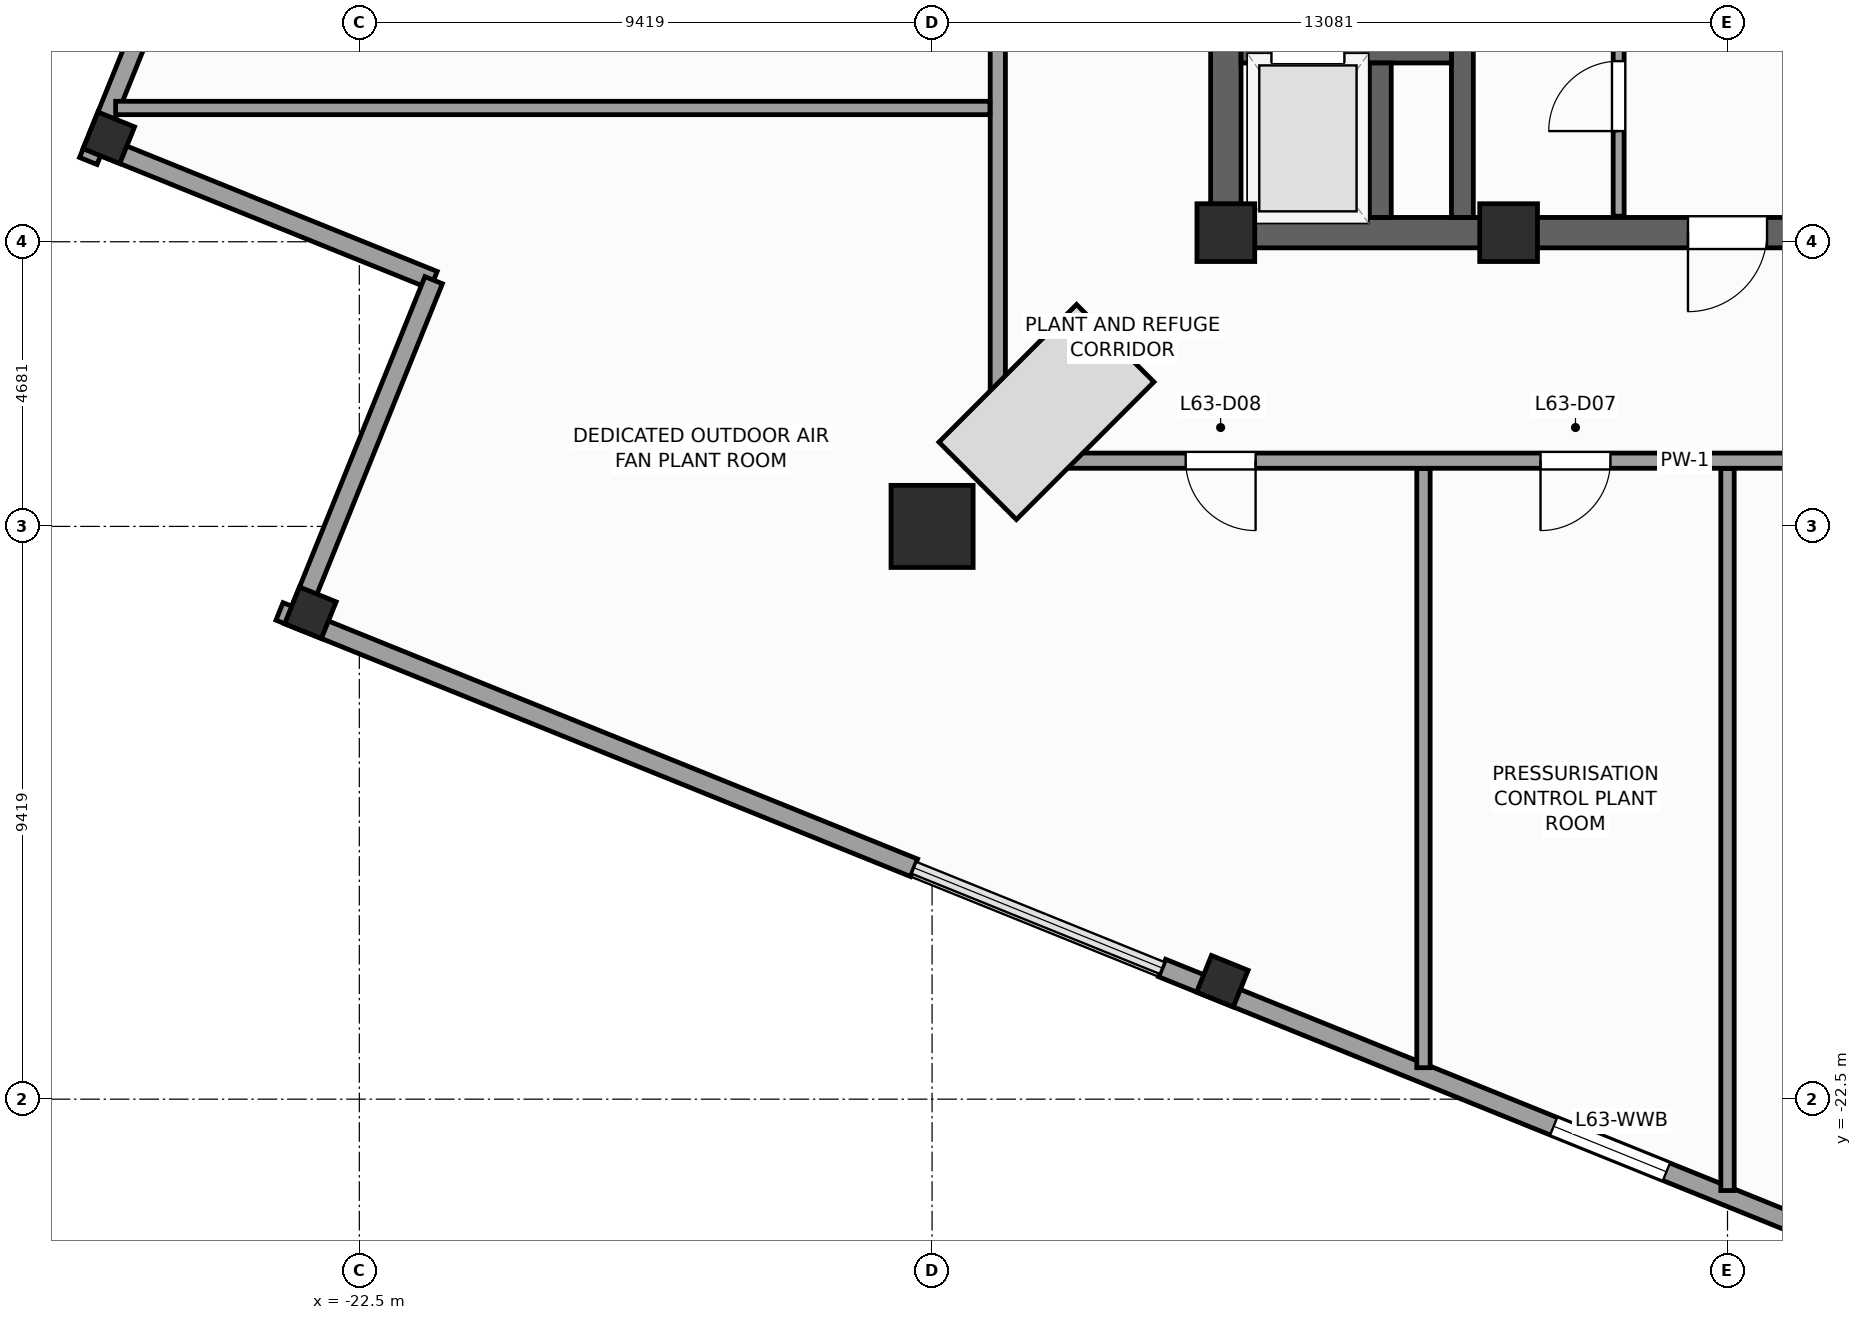
"""IFC4 building model, lengths in metres.
Left out: names, types, materials, properties, quantities, classifications, styles, units other than length and angle.
Written with IfcOpenShell. Run it as: python <this file> out.ifc"""

import sys

from ifc_helpers import new_model, si_unit, direction, frame, frame_2d, origin, origin_2d, place, context, subcontext, project, spatial, rectangle, extrude, source, transform, mapped, element, fill, save


model = new_model("IFC4")
c1 = context("Model", 3, precision=1e-05, world=origin(), true_north=direction((0.0, 1.0)))
c2 = subcontext(c1, "Body", "Model", "MODEL_VIEW")
j1 = project(units=[si_unit("LENGTHUNIT", "METRE"), si_unit("PLANEANGLEUNIT", "RADIAN")], contexts=[c1])
p1 = place(None, origin())
s1 = spatial("IfcSite", under=j1, at=p1, CompositionType="ELEMENT")
p2 = place(p1, origin())
s2 = spatial("IfcBuilding", under=s1, at=p2, CompositionType="ELEMENT")
p3 = place(p2, frame((0.0, 0.0, 260.2)))
s3 = spatial("IfcBuildingStorey", under=s2, at=p3, CompositionType="ELEMENT", Elevation=260.2)
p4 = place(p3, frame((-8.5, -8.25, 0.0), z_axis=(0.0, 0.0, 1.0), x_axis=(1.0, 0.0, 0.0)))
e1 = element("IfcWall", 1, at=p4, inside=s3, PredefinedType="SHEAR", context=c2, shape_type="SweptSolid", body=[
    extrude(rectangle(XDim=17.0, YDim=0.5, at=frame_2d((8.5, 0.0))), origin(), (0.0, 0.0, 1.0), 5.0),
])
p5 = place(p4, frame((7.85, 0.0, 0.0)))
e2 = element("IfcOpeningElement", 2, at=p5, cuts=e1, PredefinedType="OPENING", context=c2, shape_type="SweptSolid", body=[
    extrude(rectangle(XDim=1.3, YDim=2.2, at=frame_2d((0.65, 1.1))), frame((0.0, 0.26, 0.0), z_axis=(0.0, -1.0, 0.0), x_axis=(1.0, 0.0, 0.0)), (0.0, 0.0, 1.0), 0.52),
])
p6 = place(p3, frame((-8.25, -8.0, 0.0), z_axis=(0.0, 0.0, 1.0), x_axis=(0.0, 1.0, 0.0)))
e3 = element("IfcWall", 3, at=p6, inside=s3, PredefinedType="SHEAR", context=c2, shape_type="SweptSolid", body=[
    extrude(rectangle(XDim=16.0, YDim=0.5, at=frame_2d((8.0, 0.0))), origin(), (0.0, 0.0, 1.0), 5.0),
])
p7 = place(p6, frame((4.69, 0.0, 0.0)))
e4 = element("IfcOpeningElement", 4, at=p7, cuts=e3, PredefinedType="OPENING", context=c2, shape_type="SweptSolid", body=[
    extrude(rectangle(XDim=1.3, YDim=2.2, at=frame_2d((0.65, 1.1))), frame((0.0, 0.26, 0.0), z_axis=(0.0, -1.0, 0.0), x_axis=(1.0, 0.0, 0.0)), (0.0, 0.0, 1.0), 0.52),
])
p8 = place(p3, frame((-4.36, -8.0, 0.0), z_axis=(0.0, 0.0, 1.0), x_axis=(0.0, 1.0, 0.0)))
e5 = element("IfcWall", 5, at=p8, inside=s3, PredefinedType="SHEAR", context=c2, shape_type="SweptSolid", body=[
    extrude(rectangle(XDim=16.0, YDim=0.36, at=frame_2d((8.0, 0.0))), origin(), (0.0, 0.0, 1.0), 5.0),
])
p9 = place(p3, frame((-8.0, -5.28, 0.0), z_axis=(0.0, 0.0, 1.0), x_axis=(1.0, 0.0, 0.0)))
e6 = element("IfcWall", 6, at=p9, inside=s3, PredefinedType="SHEAR", context=c2, shape_type="SweptSolid", body=[
    extrude(rectangle(XDim=3.46, YDim=0.36, at=frame_2d((1.73, 0.0))), origin(), (0.0, 0.0, 1.0), 5.0),
])
p10 = place(p9, frame((0.5, 0.0, 0.0)))
e7 = element("IfcOpeningElement", 7, at=p10, cuts=e6, PredefinedType="OPENING", context=c2, shape_type="SweptSolid", body=[
    extrude(rectangle(XDim=1.2, YDim=2.25, at=frame_2d((0.6, 1.125))), frame((0.0, 0.19, 0.0), z_axis=(0.0, -1.0, 0.0), x_axis=(1.0, 0.0, 0.0)), (0.0, 0.0, 1.0), 0.38),
])
p11 = place(p3, frame((-5.71, -8.0, 0.0), z_axis=(0.0, 0.0, 1.0), x_axis=(0.0, 1.0, 0.0)))
e8 = element("IfcWall", 8, at=p11, inside=s3, PredefinedType="SHEAR", context=c2, shape_type="SweptSolid", body=[
    extrude(rectangle(XDim=2.54, YDim=0.36, at=frame_2d((1.27, 0.0))), origin(), (0.0, 0.0, 1.0), 5.0),
])
m1 = source(origin(), c2, "Body", "SweptSolid", [
    extrude(rectangle(XDim=0.95, YDim=0.95, at=origin_2d()), origin(), (0.0, 0.0, 1.0), 5.0),
])
for number, where, z_axis, x_axis in (
    (9, (-8.25, -8.25, 0.0), (0.0, 0.0, 1.0), (1.0, 0.0, 0.0)),
    (10, (-3.6, -8.25, 0.0), (0.0, 0.0, 1.0), (1.0, 0.0, 0.0)),
):
    element("IfcColumn", number, at=place(p3, frame(where, z_axis=z_axis, x_axis=x_axis)), inside=s3, PredefinedType="PILASTER", context=c2, shape_type="MappedRepresentation", body=[
        mapped(m1, transform((0.0, 0.0, 0.0), scale=1.0)),
    ])
m2 = source(origin(), c2, "Body", "SweptSolid", [
    extrude(rectangle(XDim=1.35, YDim=1.35, at=origin_2d()), origin(), (0.0, 0.0, 1.0), 5.0),
])
p12 = place(p3, frame((-13.081, -13.081, 0.0), z_axis=(0.0, 0.0, 1.0), x_axis=(1.0, 0.0, 0.0)))
e11 = element("IfcColumn", 11, at=p12, inside=s3, PredefinedType="COLUMN", context=c2, shape_type="MappedRepresentation", body=[
    mapped(m2, transform((0.0, 0.0, 0.0), scale=1.0)),
])
m3 = source(origin(), c2, "Body", "SweptSolid", [
    extrude(rectangle(XDim=0.65, YDim=0.65, at=origin_2d()), origin(), (0.0, 0.0, 1.0), 5.0),
])
for number, where, z_axis, x_axis in (
    (12, (-26.62, -6.69, 0.0), (0.0, 0.0, 1.0), (0.375, 0.927, 0.0)),
    (13, (-23.304, -14.501, 0.0), (0.0, 0.0, 1.0), (0.375, 0.927, 0.0)),
    (14, (-8.307, -20.56, 0.0), (0.0, 0.0, 1.0), (0.375, 0.927, 0.0)),
):
    element("IfcColumn", number, at=place(p3, frame(where, z_axis=z_axis, x_axis=x_axis)), inside=s3, PredefinedType="COLUMN", context=c2, shape_type="MappedRepresentation", body=[
        mapped(m3, transform((0.0, 0.0, 0.0), scale=1.0)),
    ])
p13 = place(p3, frame((-26.841, -6.784, 0.0), z_axis=(0.0, 0.0, 1.0), x_axis=(0.927171722085, -0.374636620962, 0.0)))
e15 = element("IfcWall", 15, at=p13, inside=s3, PredefinedType="STANDARD", context=c2, shape_type="SweptSolid", body=[
    extrude(rectangle(XDim=6.0, YDim=0.31, at=frame_2d((3.0, 0.0))), origin(), (0.0, 0.0, 1.0), 4.05),
])
p14 = place(p3, frame((-21.278, -9.032, 0.0), z_axis=(0.0, 0.0, 1.0), x_axis=(-0.374602739196, -0.927185411764, 0.0)))
e16 = element("IfcWall", 16, at=p14, inside=s3, PredefinedType="STANDARD", context=c2, shape_type="SweptSolid", body=[
    extrude(rectangle(XDim=6.155, YDim=0.31, at=frame_2d((3.078, 0.0))), origin(), (0.0, 0.0, 1.0), 4.75),
])
p15 = place(p3, frame((-20.718, 8.371, 0.0), z_axis=(0.0, 0.0, 1.0), x_axis=(-0.374600710538, -0.927186231382, 0.0)))
e17 = element("IfcWall", 17, at=p15, inside=s3, PredefinedType="STANDARD", context=c2, shape_type="SweptSolid", body=[
    extrude(rectangle(XDim=16.655, YDim=0.31, at=frame_2d((8.328, 0.0))), origin(), (0.0, 0.0, 1.0), 4.15),
])
p16 = place(p15, frame((6.495, 0.0, 0.65)))
e18 = element("IfcOpeningElement", 18, at=p16, cuts=e17, PredefinedType="OPENING", context=c2, shape_type="SweptSolid", body=[
    extrude(rectangle(XDim=2.0, YDim=1.45, at=frame_2d((1.0, 0.725))), frame((0.0, 0.165, 0.0), z_axis=(0.0, -1.0, 0.0), x_axis=(1.0, 0.0, 0.0)), (0.0, 0.0, 1.0), 0.33),
])
p17 = place(p3, frame((-23.813, -14.479, 0.0), z_axis=(0.0, 0.0, 1.0), x_axis=(0.927178527544, -0.374619777991, 0.0)))
e19 = element("IfcWall", 19, at=p17, inside=s3, PredefinedType="STANDARD", context=c2, shape_type="SweptSolid", body=[
    extrude(rectangle(XDim=11.255, YDim=0.31, at=frame_2d((5.627, 0.0))), origin(), (0.0, 0.0, 1.0), 4.15),
])
p18 = place(p3, frame((-9.298, -20.343, 0.0), z_axis=(0.0, 0.0, 1.0), x_axis=(0.927183654967, -0.374607087443, 0.0)))
e20 = element("IfcWall", 20, at=p18, inside=s3, PredefinedType="STANDARD", context=c2, shape_type="SweptSolid", body=[
    extrude(rectangle(XDim=17.655, YDim=0.31, at=frame_2d((8.828, 0.0))), origin(), (0.0, 0.0, 1.0), 4.15),
])
p19 = place(p18, frame((6.945, 0.0, 0.65)))
e21 = element("IfcOpeningElement", 21, at=p19, cuts=e20, PredefinedType="OPENING", context=c2, shape_type="SweptSolid", body=[
    extrude(rectangle(XDim=2.0, YDim=1.45, at=frame_2d((1.0, 0.725))), frame((0.0, 0.165, 0.0), z_axis=(0.0, -1.0, 0.0), x_axis=(1.0, 0.0, 0.0)), (0.0, 0.0, 1.0), 0.33),
])
p20 = place(p3, frame((-1.79, -7.98, 0.0), z_axis=(0.0, 0.0, 1.0), x_axis=(0.0, 1.0, 0.0)))
e22 = element("IfcWall", 22, at=p20, inside=s3, PredefinedType="PARTITIONING", context=c2, shape_type="SweptSolid", body=[
    extrude(rectangle(XDim=12.38, YDim=0.18, at=frame_2d((6.19, 0.0))), origin(), (0.0, 0.0, 1.0), 4.75),
])
p21 = place(p20, frame((8.8, 0.0, 0.0)))
e23 = element("IfcOpeningElement", 23, at=p21, cuts=e22, PredefinedType="OPENING", context=c2, shape_type="SweptSolid", body=[
    extrude(rectangle(XDim=1.1, YDim=2.2, at=frame_2d((0.55, 1.1))), frame((0.0, 0.1, 0.0), z_axis=(0.0, -1.0, 0.0), x_axis=(1.0, 0.0, 0.0)), (0.0, 0.0, 1.0), 0.2),
])
p22 = place(p20, frame((10.86, 0.0, 0.0)))
e24 = element("IfcOpeningElement", 24, at=p22, cuts=e22, PredefinedType="OPENING", context=c2, shape_type="SweptSolid", body=[
    extrude(rectangle(XDim=1.1, YDim=2.2, at=frame_2d((0.55, 1.1))), frame((0.0, 0.1, 0.0), z_axis=(0.0, -1.0, 0.0), x_axis=(1.0, 0.0, 0.0)), (0.0, 0.0, 1.0), 0.2),
])
p23 = place(p20, frame((1.4, 0.0, 0.0)))
e25 = element("IfcOpeningElement", 25, at=p23, cuts=e22, PredefinedType="OPENING", context=c2, shape_type="SweptSolid", body=[
    extrude(rectangle(XDim=1.15, YDim=2.25, at=frame_2d((0.575, 1.125))), frame((0.0, 0.1, 0.0), z_axis=(0.0, -1.0, 0.0), x_axis=(1.0, 0.0, 0.0)), (0.0, 0.0, 1.0), 0.2),
])
p24 = place(p20, frame((5.6, 0.0, 0.0)))
e26 = element("IfcOpeningElement", 26, at=p24, cuts=e22, PredefinedType="OPENING", context=c2, shape_type="SweptSolid", body=[
    extrude(rectangle(XDim=1.15, YDim=2.25, at=frame_2d((0.575, 1.125))), frame((0.0, 0.1, 0.0), z_axis=(0.0, -1.0, 0.0), x_axis=(1.0, 0.0, 0.0)), (0.0, 0.0, 1.0), 0.2),
])
p25 = place(p3, frame((-12.0, -12.0, 0.0), z_axis=(0.0, 0.0, 1.0), x_axis=(1.0, 0.0, 0.0)))
e27 = element("IfcWall", 27, at=p25, inside=s3, PredefinedType="PARTITIONING", context=c2, shape_type="SweptSolid", body=[
    extrude(rectangle(XDim=22.6, YDim=0.25, at=frame_2d((11.3, 0.0))), origin(), (0.0, 0.0, 1.0), 4.75),
])
p26 = place(p25, frame((18.811, 0.0, 0.0)))
e28 = element("IfcOpeningElement", 28, at=p26, cuts=e27, PredefinedType="OPENING", context=c2, shape_type="SweptSolid", body=[
    extrude(rectangle(XDim=1.15, YDim=2.25, at=frame_2d((0.575, 1.125))), frame((0.0, 0.135, 0.0), z_axis=(0.0, -1.0, 0.0), x_axis=(1.0, 0.0, 0.0)), (0.0, 0.0, 1.0), 0.27),
])
p27 = place(p25, frame((13.675, 0.0, 0.0)))
e29 = element("IfcOpeningElement", 29, at=p27, cuts=e27, PredefinedType="OPENING", context=c2, shape_type="SweptSolid", body=[
    extrude(rectangle(XDim=1.15, YDim=2.25, at=frame_2d((0.575, 1.125))), frame((0.0, 0.135, 0.0), z_axis=(0.0, -1.0, 0.0), x_axis=(1.0, 0.0, 0.0)), (0.0, 0.0, 1.0), 0.27),
])
p28 = place(p25, frame((8.925, 0.0, 0.0)))
e30 = element("IfcOpeningElement", 30, at=p28, cuts=e27, PredefinedType="OPENING", context=c2, shape_type="SweptSolid", body=[
    extrude(rectangle(XDim=1.15, YDim=2.25, at=frame_2d((0.575, 1.125))), frame((0.0, 0.135, 0.0), z_axis=(0.0, -1.0, 0.0), x_axis=(1.0, 0.0, 0.0)), (0.0, 0.0, 1.0), 0.27),
])
p29 = place(p25, frame((3.089, 0.0, 0.0)))
e31 = element("IfcOpeningElement", 31, at=p29, cuts=e27, PredefinedType="OPENING", context=c2, shape_type="SweptSolid", body=[
    extrude(rectangle(XDim=1.15, YDim=2.25, at=frame_2d((0.575, 1.125))), frame((0.0, 0.135, 0.0), z_axis=(0.0, -1.0, 0.0), x_axis=(1.0, 0.0, 0.0)), (0.0, 0.0, 1.0), 0.27),
])
p30 = place(p3, frame((-12.0, -11.9, 0.0), z_axis=(0.0, 0.0, 1.0), x_axis=(0.0, 1.0, 0.0)))
e32 = element("IfcWall", 32, at=p30, inside=s3, PredefinedType="PARTITIONING", context=c2, shape_type="SweptSolid", body=[
    extrude(rectangle(XDim=23.8, YDim=0.25, at=frame_2d((11.9, 0.0))), origin(), (0.0, 0.0, 1.0), 4.75),
])
p31 = place(p30, frame((11.325, 0.0, 0.0)))
e33 = element("IfcOpeningElement", 33, at=p31, cuts=e32, PredefinedType="OPENING", context=c2, shape_type="SweptSolid", body=[
    extrude(rectangle(XDim=1.15, YDim=2.25, at=frame_2d((0.575, 1.125))), frame((0.0, 0.135, 0.0), z_axis=(0.0, -1.0, 0.0), x_axis=(1.0, 0.0, 0.0)), (0.0, 0.0, 1.0), 0.27),
])
p32 = place(p3, frame((0.0, -12.13, 0.0), z_axis=(0.0, 0.0, 1.0), x_axis=(0.0, -1.0, 0.0)))
e34 = element("IfcWall", 34, at=p32, inside=s3, PredefinedType="PARTITIONING", context=c2, shape_type="SweptSolid", body=[
    extrude(rectangle(XDim=11.873, YDim=0.22, at=frame_2d((5.937, 0.0))), origin(), (0.0, 0.0, 1.0), 4.42),
])
p33 = place(p3, frame((-5.0, -12.13, 0.0), z_axis=(0.0, 0.0, 1.0), x_axis=(0.0, -1.0, 0.0)))
e35 = element("IfcWall", 35, at=p33, inside=s3, PredefinedType="PARTITIONING", context=c2, shape_type="SweptSolid", body=[
    extrude(rectangle(XDim=9.853, YDim=0.22, at=frame_2d((4.926, 0.0))), origin(), (0.0, 0.0, 1.0), 4.42),
])
p34 = place(p3, frame((-12.13, -6.2, 0.0), z_axis=(0.0, 0.0, 1.0), x_axis=(-1.0, 0.0, 0.0)))
e36 = element("IfcWall", 36, at=p34, inside=s3, PredefinedType="PARTITIONING", context=c2, shape_type="SweptSolid", body=[
    extrude(rectangle(XDim=14.378, YDim=0.22, at=frame_2d((7.189, 0.0))), origin(), (0.0, 0.0, 1.0), 4.75),
])
m4 = source(origin(), c2, "Body", "SweptSolid", [
    extrude(rectangle(XDim=2.0, YDim=1.45, at=frame_2d((1.0, 0.725))), frame((0.0, 0.03, 0.0), z_axis=(0.0, -1.0, 0.0), x_axis=(1.0, 0.0, 0.0)), (0.0, 0.0, 1.0), 0.06),
])
p35 = place(p19, origin())
e37 = element("IfcWindow", 37, at=p35, inside=s3, PartitioningType="SINGLE_PANEL", PredefinedType="WINDOW", context=c2, shape_type="MappedRepresentation", body=[
    mapped(m4, transform((0.0, 0.0, 0.0), scale=1.0)),
])
fill(e21, e37)
m5 = source(origin(), c2, "Body", "SweptSolid", [
    extrude(rectangle(XDim=1.3, YDim=2.2, at=frame_2d((0.65, 1.1))), frame((0.0, 0.025, 0.0), z_axis=(0.0, -1.0, 0.0), x_axis=(1.0, 0.0, 0.0)), (0.0, 0.0, 1.0), 0.05),
])
p36 = place(p5, frame((1.3, 0.0, 0.0), z_axis=(0.0, 0.0, 1.0), x_axis=(-1.0, 0.0, 0.0)))
e38 = element("IfcDoor", 38, at=p36, inside=s3, OperationType="SINGLE_SWING_LEFT", PredefinedType="DOOR", context=c2, shape_type="MappedRepresentation", body=[
    mapped(m5, transform((0.0, 0.0, 0.0), scale=1.0)),
])
fill(e2, e38)
m6 = source(origin(), c2, "Body", "SweptSolid", [
    extrude(rectangle(XDim=1.2, YDim=2.25, at=frame_2d((0.6, 1.125))), frame((0.0, 0.025, 0.0), z_axis=(0.0, -1.0, 0.0), x_axis=(1.0, 0.0, 0.0)), (0.0, 0.0, 1.0), 0.05),
])
p37 = place(p10, origin())
e39 = element("IfcDoor", 39, at=p37, inside=s3, OperationType="DOUBLE_DOOR_SLIDING", PredefinedType="DOOR", context=c2, shape_type="MappedRepresentation", body=[
    mapped(m6, transform((0.0, 0.0, 0.0), scale=1.0)),
])
fill(e7, e39)
m7 = source(origin(), c2, "Body", "SweptSolid", [
    extrude(rectangle(XDim=1.15, YDim=2.25, at=frame_2d((0.575, 1.125))), frame((0.0, 0.025, 0.0), z_axis=(0.0, -1.0, 0.0), x_axis=(1.0, 0.0, 0.0)), (0.0, 0.0, 1.0), 0.05),
])
p38 = place(p23, origin())
e40 = element("IfcDoor", 40, at=p38, inside=s3, OperationType="SINGLE_SWING_LEFT", PredefinedType="DOOR", context=c2, shape_type="MappedRepresentation", body=[
    mapped(m7, transform((0.0, 0.0, 0.0), scale=1.0)),
])
fill(e25, e40)
p39 = place(p28, frame((1.15, 0.0, 0.0), z_axis=(0.0, 0.0, 1.0), x_axis=(-1.0, 0.0, 0.0)))
e41 = element("IfcDoor", 41, at=p39, inside=s3, OperationType="SINGLE_SWING_LEFT", PredefinedType="DOOR", context=c2, shape_type="MappedRepresentation", body=[
    mapped(m7, transform((0.0, 0.0, 0.0), scale=1.0)),
])
fill(e30, e41)
p40 = place(p29, frame((1.15, 0.0, 0.0), z_axis=(0.0, 0.0, 1.0), x_axis=(-1.0, 0.0, 0.0)))
e42 = element("IfcDoor", 42, at=p40, inside=s3, OperationType="SINGLE_SWING_RIGHT", PredefinedType="DOOR", context=c2, shape_type="MappedRepresentation", body=[
    mapped(m7, transform((0.0, 0.0, 0.0), scale=1.0)),
])
fill(e31, e42)
save(model, sys.argv[1])
